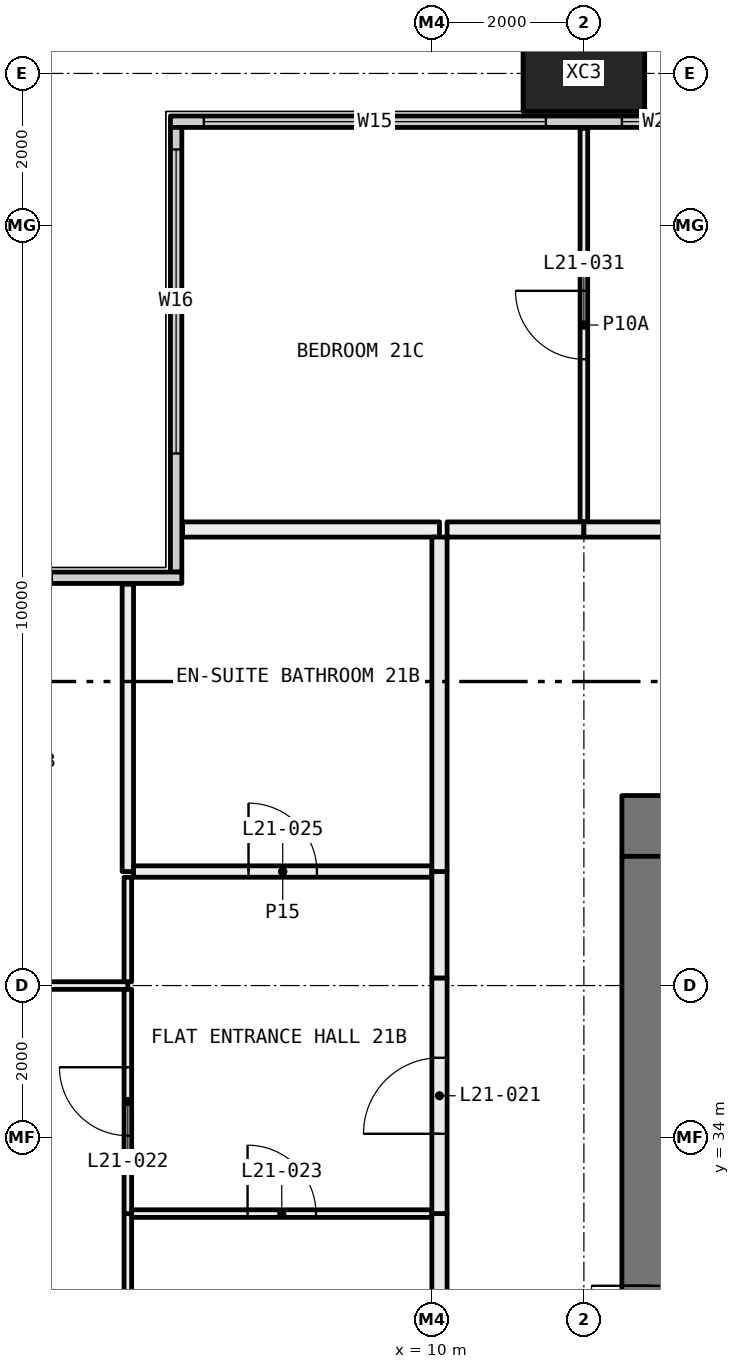
"""IFC4 building model, lengths in metres.
Left out: names, types, materials, properties, quantities, classifications, styles, units other than length and angle.
Written with IfcOpenShell. Run it as: python <this file> out.ifc"""

import sys

from ifc_helpers import new_model, si_unit, direction, frame, frame_2d, origin, origin_2d, place, context, subcontext, project, spatial, rectangle, hollow_rectangle, extrude, element, fill, save


model = new_model("IFC4")
c1 = context("Model", 3, precision=1e-05, world=origin(), true_north=direction((0.0, 1.0)))
c2 = subcontext(c1, "Body", "Model", "MODEL_VIEW")
j1 = project(units=[si_unit("LENGTHUNIT", "METRE"), si_unit("PLANEANGLEUNIT", "RADIAN")], contexts=[c1])
p1 = place(None, origin())
s1 = spatial("IfcSite", under=j1, at=p1, CompositionType="ELEMENT")
p2 = place(p1, origin())
s2 = spatial("IfcBuilding", under=s1, at=p2, CompositionType="ELEMENT")
p3 = place(p2, frame((0.0, 0.0, 85.2)))
s3 = spatial("IfcBuildingStorey", under=s2, at=p3, CompositionType="ELEMENT", Elevation=85.2)
p4 = place(p3, frame((12.0, 48.0, -0.4), z_axis=(0.0, 0.0, 1.0), x_axis=(1.0, 0.0, 0.0)))
e1 = element("IfcColumn", 1, at=p4, inside=s3, PredefinedType="COLUMN", context=c2, shape_type="SweptSolid", body=[
    extrude(hollow_rectangle(XDim=1.6, YDim=1.0, WallThickness=0.065, at=origin_2d()), origin(), (0.0, 0.0, 1.0), 3.45),
])
p5 = place(p3, frame((6.56, 47.365, 0.0), z_axis=(0.0, 0.0, 1.0), x_axis=(1.0, 0.0, 0.0)))
e2 = element("IfcWall", 2, at=p5, inside=s3, PredefinedType="ELEMENTEDWALL", context=c2, shape_type="SweptSolid", body=[
    extrude(rectangle(XDim=58.88, YDim=0.15, at=frame_2d((29.44, 0.0))), origin(), (0.0, 0.0, 1.0), 3.05),
])
p6 = place(p5, frame((0.44, 0.0, 0.45)))
e3 = element("IfcOpeningElement", 3, at=p6, cuts=e2, PredefinedType="OPENING", context=c2, shape_type="SweptSolid", body=[
    extrude(rectangle(XDim=4.5, YDim=2.55, at=frame_2d((2.25, 1.275))), frame((0.0, 0.085, 0.0), z_axis=(0.0, -1.0, 0.0), x_axis=(1.0, 0.0, 0.0)), (0.0, 0.0, 1.0), 0.17),
])
p7 = place(p5, frame((5.94, 0.0, 0.45)))
e4 = element("IfcOpeningElement", 4, at=p7, cuts=e2, PredefinedType="OPENING", context=c2, shape_type="SweptSolid", body=[
    extrude(rectangle(XDim=1.0, YDim=2.55, at=frame_2d((0.5, 1.275))), frame((0.0, 0.085, 0.0), z_axis=(0.0, -1.0, 0.0), x_axis=(1.0, 0.0, 0.0)), (0.0, 0.0, 1.0), 0.17),
])
p8 = place(p5, frame((9.69, 0.0, 0.45)))
e5 = element("IfcOpeningElement", 5, at=p8, cuts=e2, PredefinedType="OPENING", context=c2, shape_type="SweptSolid", body=[
    extrude(rectangle(XDim=1.25, YDim=2.55, at=frame_2d((0.625, 1.275))), frame((0.0, 0.085, 0.0), z_axis=(0.0, -1.0, 0.0), x_axis=(1.0, 0.0, 0.0)), (0.0, 0.0, 1.0), 0.17),
])
p9 = place(p5, frame((11.94, 0.0, 0.45)))
e6 = element("IfcOpeningElement", 6, at=p9, cuts=e2, PredefinedType="OPENING", context=c2, shape_type="SweptSolid", body=[
    extrude(rectangle(XDim=1.25, YDim=2.55, at=frame_2d((0.625, 1.275))), frame((0.0, 0.085, 0.0), z_axis=(0.0, -1.0, 0.0), x_axis=(1.0, 0.0, 0.0)), (0.0, 0.0, 1.0), 0.17),
])
p10 = place(p5, frame((15.94, 0.0, 0.45)))
e7 = element("IfcOpeningElement", 7, at=p10, cuts=e2, PredefinedType="OPENING", context=c2, shape_type="SweptSolid", body=[
    extrude(rectangle(XDim=1.0, YDim=2.55, at=frame_2d((0.5, 1.275))), frame((0.0, 0.085, 0.0), z_axis=(0.0, -1.0, 0.0), x_axis=(1.0, 0.0, 0.0)), (0.0, 0.0, 1.0), 0.17),
])
p11 = place(p5, frame((17.94, 0.0, 0.45)))
e8 = element("IfcOpeningElement", 8, at=p11, cuts=e2, PredefinedType="OPENING", context=c2, shape_type="SweptSolid", body=[
    extrude(rectangle(XDim=1.0, YDim=2.55, at=frame_2d((0.5, 1.275))), frame((0.0, 0.085, 0.0), z_axis=(0.0, -1.0, 0.0), x_axis=(1.0, 0.0, 0.0)), (0.0, 0.0, 1.0), 0.17),
])
p12 = place(p5, frame((21.69, 0.0, 0.45)))
e9 = element("IfcOpeningElement", 9, at=p12, cuts=e2, PredefinedType="OPENING", context=c2, shape_type="SweptSolid", body=[
    extrude(rectangle(XDim=1.25, YDim=2.55, at=frame_2d((0.625, 1.275))), frame((0.0, 0.085, 0.0), z_axis=(0.0, -1.0, 0.0), x_axis=(1.0, 0.0, 0.0)), (0.0, 0.0, 1.0), 0.17),
])
p13 = place(p5, frame((23.94, 0.0, 0.45)))
e10 = element("IfcOpeningElement", 10, at=p13, cuts=e2, PredefinedType="OPENING", context=c2, shape_type="SweptSolid", body=[
    extrude(rectangle(XDim=1.25, YDim=2.55, at=frame_2d((0.625, 1.275))), frame((0.0, 0.085, 0.0), z_axis=(0.0, -1.0, 0.0), x_axis=(1.0, 0.0, 0.0)), (0.0, 0.0, 1.0), 0.17),
])
p14 = place(p5, frame((27.94, 0.0, 0.45)))
e11 = element("IfcOpeningElement", 11, at=p14, cuts=e2, PredefinedType="OPENING", context=c2, shape_type="SweptSolid", body=[
    extrude(rectangle(XDim=1.0, YDim=2.55, at=frame_2d((0.5, 1.275))), frame((0.0, 0.085, 0.0), z_axis=(0.0, -1.0, 0.0), x_axis=(1.0, 0.0, 0.0)), (0.0, 0.0, 1.0), 0.17),
])
p15 = place(p5, frame((29.94, 0.0, 0.45)))
e12 = element("IfcOpeningElement", 12, at=p15, cuts=e2, PredefinedType="OPENING", context=c2, shape_type="SweptSolid", body=[
    extrude(rectangle(XDim=1.0, YDim=2.55, at=frame_2d((0.5, 1.275))), frame((0.0, 0.085, 0.0), z_axis=(0.0, -1.0, 0.0), x_axis=(1.0, 0.0, 0.0)), (0.0, 0.0, 1.0), 0.17),
])
p16 = place(p5, frame((33.69, 0.0, 0.45)))
e13 = element("IfcOpeningElement", 13, at=p16, cuts=e2, PredefinedType="OPENING", context=c2, shape_type="SweptSolid", body=[
    extrude(rectangle(XDim=1.25, YDim=2.55, at=frame_2d((0.625, 1.275))), frame((0.0, 0.085, 0.0), z_axis=(0.0, -1.0, 0.0), x_axis=(1.0, 0.0, 0.0)), (0.0, 0.0, 1.0), 0.17),
])
p17 = place(p5, frame((35.94, 0.0, 0.45)))
e14 = element("IfcOpeningElement", 14, at=p17, cuts=e2, PredefinedType="OPENING", context=c2, shape_type="SweptSolid", body=[
    extrude(rectangle(XDim=1.25, YDim=2.55, at=frame_2d((0.625, 1.275))), frame((0.0, 0.085, 0.0), z_axis=(0.0, -1.0, 0.0), x_axis=(1.0, 0.0, 0.0)), (0.0, 0.0, 1.0), 0.17),
])
p18 = place(p5, frame((39.94, 0.0, 0.45)))
e15 = element("IfcOpeningElement", 15, at=p18, cuts=e2, PredefinedType="OPENING", context=c2, shape_type="SweptSolid", body=[
    extrude(rectangle(XDim=1.0, YDim=2.55, at=frame_2d((0.5, 1.275))), frame((0.0, 0.085, 0.0), z_axis=(0.0, -1.0, 0.0), x_axis=(1.0, 0.0, 0.0)), (0.0, 0.0, 1.0), 0.17),
])
p19 = place(p5, frame((41.94, 0.0, 0.45)))
e16 = element("IfcOpeningElement", 16, at=p19, cuts=e2, PredefinedType="OPENING", context=c2, shape_type="SweptSolid", body=[
    extrude(rectangle(XDim=1.0, YDim=2.55, at=frame_2d((0.5, 1.275))), frame((0.0, 0.085, 0.0), z_axis=(0.0, -1.0, 0.0), x_axis=(1.0, 0.0, 0.0)), (0.0, 0.0, 1.0), 0.17),
])
p20 = place(p5, frame((45.69, 0.0, 0.45)))
e17 = element("IfcOpeningElement", 17, at=p20, cuts=e2, PredefinedType="OPENING", context=c2, shape_type="SweptSolid", body=[
    extrude(rectangle(XDim=1.25, YDim=2.55, at=frame_2d((0.625, 1.275))), frame((0.0, 0.085, 0.0), z_axis=(0.0, -1.0, 0.0), x_axis=(1.0, 0.0, 0.0)), (0.0, 0.0, 1.0), 0.17),
])
p21 = place(p5, frame((47.94, 0.0, 0.45)))
e18 = element("IfcOpeningElement", 18, at=p21, cuts=e2, PredefinedType="OPENING", context=c2, shape_type="SweptSolid", body=[
    extrude(rectangle(XDim=1.25, YDim=2.55, at=frame_2d((0.625, 1.275))), frame((0.0, 0.085, 0.0), z_axis=(0.0, -1.0, 0.0), x_axis=(1.0, 0.0, 0.0)), (0.0, 0.0, 1.0), 0.17),
])
p22 = place(p5, frame((51.94, 0.0, 0.45)))
e19 = element("IfcOpeningElement", 19, at=p22, cuts=e2, PredefinedType="OPENING", context=c2, shape_type="SweptSolid", body=[
    extrude(rectangle(XDim=1.0, YDim=2.55, at=frame_2d((0.5, 1.275))), frame((0.0, 0.085, 0.0), z_axis=(0.0, -1.0, 0.0), x_axis=(1.0, 0.0, 0.0)), (0.0, 0.0, 1.0), 0.17),
])
p23 = place(p5, frame((53.94, 0.0, 0.45)))
e20 = element("IfcOpeningElement", 20, at=p23, cuts=e2, PredefinedType="OPENING", context=c2, shape_type="SweptSolid", body=[
    extrude(rectangle(XDim=4.5, YDim=2.55, at=frame_2d((2.25, 1.275))), frame((0.0, 0.085, 0.0), z_axis=(0.0, -1.0, 0.0), x_axis=(1.0, 0.0, 0.0)), (0.0, 0.0, 1.0), 0.17),
])
p24 = place(p3, frame((6.635, 41.44, 0.0), z_axis=(0.0, 0.0, 1.0), x_axis=(0.0, 1.0, 0.0)))
e21 = element("IfcWall", 21, at=p24, inside=s3, PredefinedType="ELEMENTEDWALL", context=c2, shape_type="SweptSolid", body=[
    extrude(rectangle(XDim=5.85, YDim=0.15, at=frame_2d((2.925, 0.0))), origin(), (0.0, 0.0, 1.0), 3.05),
])
p25 = place(p24, frame((1.56, 0.0, 0.45)))
e22 = element("IfcOpeningElement", 22, at=p25, cuts=e21, PredefinedType="OPENING", context=c2, shape_type="SweptSolid", body=[
    extrude(rectangle(XDim=4.0, YDim=2.55, at=frame_2d((2.0, 1.275))), frame((0.0, 0.085, 0.0), z_axis=(0.0, -1.0, 0.0), x_axis=(1.0, 0.0, 0.0)), (0.0, 0.0, 1.0), 0.17),
])
p26 = place(p3, frame((0.56, 41.365, 0.0), z_axis=(0.0, 0.0, 1.0), x_axis=(1.0, 0.0, 0.0)))
e23 = element("IfcWall", 23, at=p26, inside=s3, PredefinedType="ELEMENTEDWALL", context=c2, shape_type="SweptSolid", body=[
    extrude(rectangle(XDim=6.15, YDim=0.15, at=frame_2d((3.075, 0.0))), origin(), (0.0, 0.0, 1.0), 3.05),
])
p27 = place(p26, frame((0.44, 0.0, 0.45)))
e24 = element("IfcOpeningElement", 24, at=p27, cuts=e23, PredefinedType="OPENING", context=c2, shape_type="SweptSolid", body=[
    extrude(rectangle(XDim=4.0, YDim=2.55, at=frame_2d((2.0, 1.275))), frame((0.0, 0.085, 0.0), z_axis=(0.0, -1.0, 0.0), x_axis=(1.0, 0.0, 0.0)), (0.0, 0.0, 1.0), 0.17),
])
p28 = place(p3, frame((6.0, 36.0, 0.0), z_axis=(0.0, 0.0, 1.0), x_axis=(-1.0, 0.0, 0.0)))
e25 = element("IfcWall", 25, at=p28, inside=s3, PredefinedType="PARTITIONING", context=c2, shape_type="SweptSolid", body=[
    extrude(rectangle(XDim=5.28, YDim=0.1, at=frame_2d((2.64, 0.0))), origin(), (0.0, 0.0, 1.0), 2.45),
])
p29 = place(p28, frame((2.19, 0.0, 0.0)))
e26 = element("IfcOpeningElement", 26, at=p29, cuts=e25, PredefinedType="OPENING", context=c2, shape_type="SweptSolid", body=[
    extrude(rectangle(XDim=0.9, YDim=2.1, at=frame_2d((0.45, 1.05))), frame((0.0, 0.06, 0.0), z_axis=(0.0, -1.0, 0.0), x_axis=(1.0, 0.0, 0.0)), (0.0, 0.0, 1.0), 0.12),
])
p30 = place(p3, frame((6.0, 24.05, 0.0), z_axis=(0.0, 0.0, 1.0), x_axis=(0.0, 1.0, 0.0)))
e27 = element("IfcWall", 27, at=p30, inside=s3, PredefinedType="PARTITIONING", context=c2, shape_type="SweptSolid", body=[
    extrude(rectangle(XDim=8.95, YDim=0.1, at=frame_2d((4.475, 0.0))), origin(), (0.0, 0.0, 1.0), 2.45),
])
p31 = place(p3, frame((6.0, 33.0, 0.0), z_axis=(0.0, 0.0, 1.0), x_axis=(0.0, 1.0, 0.0)))
e28 = element("IfcWall", 28, at=p31, inside=s3, PredefinedType="PARTITIONING", context=c2, shape_type="SweptSolid", body=[
    extrude(rectangle(XDim=2.95, YDim=0.1, at=frame_2d((1.475, 0.0))), origin(), (0.0, 0.0, 1.0), 2.45),
])
p32 = place(p31, frame((1.025, 0.0, 0.0)))
e29 = element("IfcOpeningElement", 29, at=p32, cuts=e28, PredefinedType="OPENING", context=c2, shape_type="SweptSolid", body=[
    extrude(rectangle(XDim=0.9, YDim=2.1, at=frame_2d((0.45, 1.05))), frame((0.0, 0.06, 0.0), z_axis=(0.0, -1.0, 0.0), x_axis=(1.0, 0.0, 0.0)), (0.0, 0.0, 1.0), 0.12),
])
p33 = place(p3, frame((6.0, 36.05, 0.0), z_axis=(0.0, 0.0, 1.0), x_axis=(0.0, 1.0, 0.0)))
e30 = element("IfcWall", 30, at=p33, inside=s3, PredefinedType="PARTITIONING", context=c2, shape_type="SweptSolid", body=[
    extrude(rectangle(XDim=1.375, YDim=0.1, at=frame_2d((0.688, 0.0))), origin(), (0.0, 0.0, 1.0), 2.45),
])
p34 = place(p3, frame((6.0, 37.5, 0.0), z_axis=(0.0, 0.0, 1.0), x_axis=(0.0, 1.0, 0.0)))
e31 = element("IfcWall", 31, at=p34, inside=s3, PredefinedType="PARTITIONING", context=c2, shape_type="SweptSolid", body=[
    extrude(rectangle(XDim=3.78, YDim=0.15, at=frame_2d((1.89, 0.0))), origin(), (0.0, 0.0, 1.0), 3.05),
])
p35 = place(p3, frame((10.0, 33.0, 0.0), z_axis=(0.0, 0.0, 1.0), x_axis=(-1.0, 0.0, 0.0)))
e32 = element("IfcWall", 32, at=p35, inside=s3, PredefinedType="PARTITIONING", context=c2, shape_type="SweptSolid", body=[
    extrude(rectangle(XDim=3.95, YDim=0.1, at=frame_2d((1.975, 0.0))), origin(), (0.0, 0.0, 1.0), 3.05),
])
p36 = place(p35, frame((1.525, 0.0, 0.0)))
e33 = element("IfcOpeningElement", 33, at=p36, cuts=e32, PredefinedType="OPENING", context=c2, shape_type="SweptSolid", body=[
    extrude(rectangle(XDim=0.9, YDim=2.1, at=frame_2d((0.45, 1.05))), frame((0.0, 0.06, 0.0), z_axis=(0.0, -1.0, 0.0), x_axis=(1.0, 0.0, 0.0)), (0.0, 0.0, 1.0), 0.12),
])
p37 = place(p3, frame((10.1, 24.1, 0.0), z_axis=(0.0, 0.0, 1.0), x_axis=(0.0, 1.0, 0.0)))
e34 = element("IfcWall", 34, at=p37, inside=s3, PredefinedType="PARTITIONING", context=c2, shape_type="SweptSolid", body=[
    extrude(rectangle(XDim=8.9, YDim=0.2, at=frame_2d((4.45, 0.0))), origin(), (0.0, 0.0, 1.0), 3.05),
])
p38 = place(p3, frame((10.0, 37.5, 0.0), z_axis=(0.0, 0.0, 1.0), x_axis=(-1.0, 0.0, 0.0)))
e35 = element("IfcWall", 35, at=p38, inside=s3, PredefinedType="PARTITIONING", context=c2, shape_type="SweptSolid", body=[
    extrude(rectangle(XDim=3.925, YDim=0.15, at=frame_2d((1.962, 0.0))), origin(), (0.0, 0.0, 1.0), 3.05),
])
p39 = place(p38, frame((1.512, 0.0, 0.0)))
e36 = element("IfcOpeningElement", 36, at=p39, cuts=e35, PredefinedType="OPENING", context=c2, shape_type="SweptSolid", body=[
    extrude(rectangle(XDim=0.9, YDim=2.1, at=frame_2d((0.45, 1.05))), frame((0.0, 0.085, 0.0), z_axis=(0.0, -1.0, 0.0), x_axis=(1.0, 0.0, 0.0)), (0.0, 0.0, 1.0), 0.17),
])
p40 = place(p3, frame((10.1, 33.0, 0.0), z_axis=(0.0, 0.0, 1.0), x_axis=(0.0, 1.0, 0.0)))
e37 = element("IfcWall", 37, at=p40, inside=s3, PredefinedType="PARTITIONING", context=c2, shape_type="SweptSolid", body=[
    extrude(rectangle(XDim=3.1, YDim=0.2, at=frame_2d((1.55, 0.0))), origin(), (0.0, 0.0, 1.0), 2.45),
])
p41 = place(p40, frame((1.05, 0.0, 0.0)))
e38 = element("IfcOpeningElement", 38, at=p41, cuts=e37, PredefinedType="OPENING", context=c2, shape_type="SweptSolid", body=[
    extrude(rectangle(XDim=1.0, YDim=2.1, at=frame_2d((0.5, 1.05))), frame((0.0, 0.11, 0.0), z_axis=(0.0, -1.0, 0.0), x_axis=(1.0, 0.0, 0.0)), (0.0, 0.0, 1.0), 0.22),
])
p42 = place(p3, frame((10.1, 36.1, 0.0), z_axis=(0.0, 0.0, 1.0), x_axis=(0.0, 1.0, 0.0)))
e39 = element("IfcWall", 39, at=p42, inside=s3, PredefinedType="PARTITIONING", context=c2, shape_type="SweptSolid", body=[
    extrude(rectangle(XDim=1.4, YDim=0.2, at=frame_2d((0.7, 0.0))), origin(), (0.0, 0.0, 1.0), 3.05),
])
p43 = place(p3, frame((10.1, 42.0, 0.0), z_axis=(0.0, 0.0, 1.0), x_axis=(-1.0, 0.0, 0.0)))
e40 = element("IfcWall", 40, at=p43, inside=s3, PredefinedType="PARTITIONING", context=c2, shape_type="SweptSolid", body=[
    extrude(rectangle(XDim=3.38, YDim=0.2, at=frame_2d((1.69, 0.0))), origin(), (0.0, 0.0, 1.0), 3.05),
])
p44 = place(p3, frame((10.1, 37.5, 0.0), z_axis=(0.0, 0.0, 1.0), x_axis=(0.0, 1.0, 0.0)))
e41 = element("IfcWall", 41, at=p44, inside=s3, PredefinedType="PARTITIONING", context=c2, shape_type="SweptSolid", body=[
    extrude(rectangle(XDim=4.4, YDim=0.2, at=frame_2d((2.2, 0.0))), origin(), (0.0, 0.0, 1.0), 3.05),
])
p45 = place(p3, frame((12.0, 42.1, 0.0), z_axis=(0.0, 0.0, 1.0), x_axis=(0.0, 1.0, 0.0)))
e42 = element("IfcWall", 42, at=p45, inside=s3, PredefinedType="PARTITIONING", context=c2, shape_type="SweptSolid", body=[
    extrude(rectangle(XDim=5.18, YDim=0.1, at=frame_2d((2.59, 0.0))), origin(), (0.0, 0.0, 1.0), 3.05),
])
p46 = place(p45, frame((2.14, 0.0, 0.0)))
e43 = element("IfcOpeningElement", 43, at=p46, cuts=e42, PredefinedType="OPENING", context=c2, shape_type="SweptSolid", body=[
    extrude(rectangle(XDim=0.9, YDim=2.1, at=frame_2d((0.45, 1.05))), frame((0.0, 0.06, 0.0), z_axis=(0.0, -1.0, 0.0), x_axis=(1.0, 0.0, 0.0)), (0.0, 0.0, 1.0), 0.12),
])
p47 = place(p3, frame((10.2, 42.0, 0.0), z_axis=(0.0, 0.0, 1.0), x_axis=(1.0, 0.0, 0.0)))
e44 = element("IfcWall", 44, at=p47, inside=s3, PredefinedType="PARTITIONING", context=c2, shape_type="SweptSolid", body=[
    extrude(rectangle(XDim=1.8, YDim=0.2, at=frame_2d((0.9, 0.0))), origin(), (0.0, 0.0, 1.0), 3.05),
])
p48 = place(p3, frame((12.0, 42.0, 0.0), z_axis=(0.0, 0.0, 1.0), x_axis=(1.0, 0.0, 0.0)))
e45 = element("IfcWall", 45, at=p48, inside=s3, PredefinedType="PARTITIONING", context=c2, shape_type="SweptSolid", body=[
    extrude(rectangle(XDim=6.0, YDim=0.2, at=frame_2d((3.0, 0.0))), origin(), (0.0, 0.0, 1.0), 3.05),
])
p49 = place(p3, frame((12.5, 38.1, 0.0), z_axis=(0.0, 0.0, 1.0), x_axis=(1.0, 0.0, 0.0)))
e46 = element("IfcWall", 46, at=p49, inside=s3, PredefinedType="SHEAR", context=c2, shape_type="SweptSolid", body=[
    extrude(rectangle(XDim=11.0, YDim=0.8, at=frame_2d((5.5, 0.0))), origin(), (0.0, 0.0, 1.0), 3.05),
])
p50 = place(p49, frame((8.4, 0.0, 0.0)))
e47 = element("IfcOpeningElement", 47, at=p50, cuts=e46, PredefinedType="OPENING", context=c2, shape_type="SweptSolid", body=[
    extrude(rectangle(XDim=1.6, YDim=2.1, at=frame_2d((0.8, 1.05))), frame((0.0, 0.41, 0.0), z_axis=(0.0, -1.0, 0.0), x_axis=(1.0, 0.0, 0.0)), (0.0, 0.0, 1.0), 0.82),
])
p51 = place(p3, frame((12.9, 22.3, 0.0), z_axis=(0.0, 0.0, 1.0), x_axis=(0.0, 1.0, 0.0)))
e48 = element("IfcWall", 48, at=p51, inside=s3, PredefinedType="SHEAR", context=c2, shape_type="SweptSolid", body=[
    extrude(rectangle(XDim=15.4, YDim=0.8, at=frame_2d((7.7, 0.0))), origin(), (0.0, 0.0, 1.0), 3.05),
])
p52 = place(p51, frame((8.15, 0.0, 0.0)))
e49 = element("IfcOpeningElement", 49, at=p52, cuts=e48, PredefinedType="OPENING", context=c2, shape_type="SweptSolid", body=[
    extrude(rectangle(XDim=1.6, YDim=2.1, at=frame_2d((0.8, 1.05))), frame((0.0, 0.41, 0.0), z_axis=(0.0, -1.0, 0.0), x_axis=(1.0, 0.0, 0.0)), (0.0, 0.0, 1.0), 0.82),
])
p53 = place(p51, frame((2.05, 0.0, 0.0)))
e50 = element("IfcOpeningElement", 50, at=p53, cuts=e48, PredefinedType="OPENING", context=c2, shape_type="SweptSolid", body=[
    extrude(rectangle(XDim=1.0, YDim=2.1, at=frame_2d((0.5, 1.05))), frame((0.0, 0.41, 0.0), z_axis=(0.0, -1.0, 0.0), x_axis=(1.0, 0.0, 0.0)), (0.0, 0.0, 1.0), 0.82),
])
p54 = place(p6, origin())
e51 = element("IfcWindow", 51, at=p54, inside=s3, PartitioningType="SINGLE_PANEL", PredefinedType="WINDOW", context=c2, shape_type="SweptSolid", body=[
    extrude(rectangle(XDim=4.5, YDim=2.55, at=frame_2d((2.25, 1.275))), frame((0.0, 0.03, 0.0), z_axis=(0.0, -1.0, 0.0), x_axis=(1.0, 0.0, 0.0)), (0.0, 0.0, 1.0), 0.06),
])
fill(e3, e51)
p55 = place(p7, origin())
e52 = element("IfcWindow", 52, at=p55, inside=s3, PartitioningType="SINGLE_PANEL", PredefinedType="WINDOW", context=c2, shape_type="SweptSolid", body=[
    extrude(rectangle(XDim=1.0, YDim=2.55, at=frame_2d((0.5, 1.275))), frame((0.0, 0.03, 0.0), z_axis=(0.0, -1.0, 0.0), x_axis=(1.0, 0.0, 0.0)), (0.0, 0.0, 1.0), 0.06),
])
fill(e4, e52)
p56 = place(p25, origin())
e53 = element("IfcWindow", 53, at=p56, inside=s3, PartitioningType="SINGLE_PANEL", PredefinedType="WINDOW", context=c2, shape_type="SweptSolid", body=[
    extrude(rectangle(XDim=4.0, YDim=2.55, at=frame_2d((2.0, 1.275))), frame((0.0, 0.03, 0.0), z_axis=(0.0, -1.0, 0.0), x_axis=(1.0, 0.0, 0.0)), (0.0, 0.0, 1.0), 0.06),
])
fill(e22, e53)
p57 = place(p41, origin())
e54 = element("IfcDoor", 54, at=p57, inside=s3, OperationType="SINGLE_SWING_RIGHT", PredefinedType="DOOR", context=c2, shape_type="SweptSolid", body=[
    extrude(rectangle(XDim=1.0, YDim=2.1, at=frame_2d((0.5, 1.05))), frame((0.0, 0.025, 0.0), z_axis=(0.0, -1.0, 0.0), x_axis=(1.0, 0.0, 0.0)), (0.0, 0.0, 1.0), 0.05),
])
fill(e38, e54)
p58 = place(p32, origin())
e55 = element("IfcDoor", 55, at=p58, inside=s3, OperationType="SINGLE_SWING_LEFT", PredefinedType="DOOR", context=c2, shape_type="SweptSolid", body=[
    extrude(rectangle(XDim=0.9, YDim=2.1, at=frame_2d((0.45, 1.05))), frame((0.0, 0.025, 0.0), z_axis=(0.0, -1.0, 0.0), x_axis=(1.0, 0.0, 0.0)), (0.0, 0.0, 1.0), 0.05),
])
fill(e29, e55)
p59 = place(p36, frame((0.9, 0.0, 0.0), x_axis=(-1.0, 0.0, 0.0)))
e56 = element("IfcDoor", 56, at=p59, inside=s3, OperationType="SINGLE_SWING_RIGHT", PredefinedType="DOOR", context=c2, shape_type="SweptSolid", body=[
    extrude(rectangle(XDim=0.9, YDim=2.1, at=frame_2d((0.45, 1.05))), frame((0.0, 0.025, 0.0), z_axis=(0.0, -1.0, 0.0), x_axis=(1.0, 0.0, 0.0)), (0.0, 0.0, 1.0), 0.05),
])
fill(e33, e56)
p60 = place(p39, frame((0.9, 0.0, 0.0), x_axis=(-1.0, 0.0, 0.0)))
e57 = element("IfcDoor", 57, at=p60, inside=s3, OperationType="SINGLE_SWING_RIGHT", PredefinedType="DOOR", context=c2, shape_type="SweptSolid", body=[
    extrude(rectangle(XDim=0.9, YDim=2.1, at=frame_2d((0.45, 1.05))), frame((0.0, 0.025, 0.0), z_axis=(0.0, -1.0, 0.0), x_axis=(1.0, 0.0, 0.0)), (0.0, 0.0, 1.0), 0.05),
])
fill(e36, e57)
p61 = place(p46, origin())
e58 = element("IfcDoor", 58, at=p61, inside=s3, OperationType="SINGLE_SWING_LEFT", PredefinedType="DOOR", context=c2, shape_type="SweptSolid", body=[
    extrude(rectangle(XDim=0.9, YDim=2.1, at=frame_2d((0.45, 1.05))), frame((0.0, 0.025, 0.0), z_axis=(0.0, -1.0, 0.0), x_axis=(1.0, 0.0, 0.0)), (0.0, 0.0, 1.0), 0.05),
])
fill(e43, e58)
p62 = place(p52, origin())
e59 = element("IfcDoor", 59, at=p62, inside=s3, OperationType="DOUBLE_DOOR_SINGLE_SWING", PredefinedType="DOOR", context=c2, shape_type="SweptSolid", body=[
    extrude(rectangle(XDim=1.6, YDim=2.1, at=frame_2d((0.8, 1.05))), frame((0.0, 0.025, 0.0), z_axis=(0.0, -1.0, 0.0), x_axis=(1.0, 0.0, 0.0)), (0.0, 0.0, 1.0), 0.05),
])
fill(e49, e59)
save(model, sys.argv[1])
